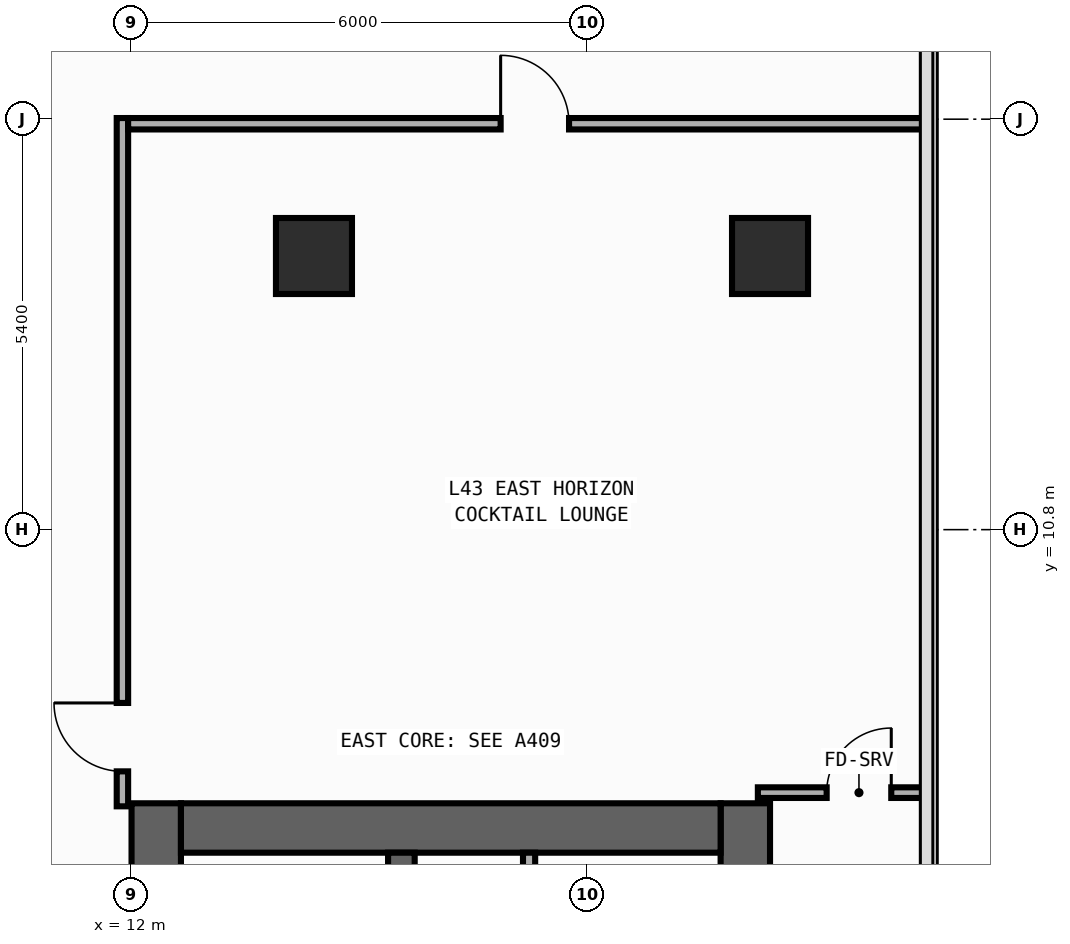
"""IFC4 building model, lengths in metres.
Left out: names, types, materials, properties, quantities, classifications, styles, units other than length and angle.
Written with IfcOpenShell. Run it as: python <this file> out.ifc"""

import sys

from ifc_helpers import new_model, si_unit, direction, frame, frame_2d, origin, origin_2d, place, context, subcontext, project, spatial, rectangle, extrude, element, fill, save


model = new_model("IFC4")
c1 = context("Model", 3, precision=1e-05, world=origin(), true_north=direction((0.0, 1.0)))
c2 = subcontext(c1, "Body", "Model", "MODEL_VIEW")
j1 = project(units=[si_unit("LENGTHUNIT", "METRE"), si_unit("PLANEANGLEUNIT", "RADIAN")], contexts=[c1])
p1 = place(None, origin())
s1 = spatial("IfcSite", under=j1, at=p1, CompositionType="ELEMENT")
p2 = place(p1, origin())
s2 = spatial("IfcBuilding", under=s1, at=p2, CompositionType="ELEMENT")
p3 = place(p2, frame((0.0, 0.0, 187.8)))
s3 = spatial("IfcBuildingStorey", under=s2, at=p3, CompositionType="ELEMENT", Elevation=187.8)
p4 = place(p3, frame((12.325, -19.8, 0.0), z_axis=(0.0, 0.0, 1.0), x_axis=(0.0, 1.0, 0.0)))
e1 = element("IfcWall", 1, at=p4, inside=s3, PredefinedType="SHEAR", context=c2, shape_type="SweptSolid", body=[
    extrude(rectangle(XDim=27.0, YDim=0.65, at=frame_2d((13.5, 0.0))), origin(), (0.0, 0.0, 1.0), 3.54),
])
p5 = place(p4, frame((23.05, 0.0, 0.0)))
e2 = element("IfcOpeningElement", 2, at=p5, cuts=e1, PredefinedType="OPENING", context=c2, shape_type="SweptSolid", body=[
    extrude(rectangle(XDim=1.1, YDim=2.2, at=frame_2d((0.55, 1.1))), frame((0.0, 0.335, 0.0), z_axis=(0.0, -1.0, 0.0), x_axis=(1.0, 0.0, 0.0)), (0.0, 0.0, 1.0), 0.67),
])
p6 = place(p4, frame((19.85, 0.0, 0.0)))
e3 = element("IfcOpeningElement", 3, at=p6, cuts=e1, PredefinedType="OPENING", context=c2, shape_type="SweptSolid", body=[
    extrude(rectangle(XDim=1.1, YDim=2.2, at=frame_2d((0.55, 1.1))), frame((0.0, 0.335, 0.0), z_axis=(0.0, -1.0, 0.0), x_axis=(1.0, 0.0, 0.0)), (0.0, 0.0, 1.0), 0.67),
])
p7 = place(p4, frame((16.65, 0.0, 0.0)))
e4 = element("IfcOpeningElement", 4, at=p7, cuts=e1, PredefinedType="OPENING", context=c2, shape_type="SweptSolid", body=[
    extrude(rectangle(XDim=1.1, YDim=2.2, at=frame_2d((0.55, 1.1))), frame((0.0, 0.335, 0.0), z_axis=(0.0, -1.0, 0.0), x_axis=(1.0, 0.0, 0.0)), (0.0, 0.0, 1.0), 0.67),
])
p8 = place(p4, frame((10.175, 0.0, 0.0)))
e5 = element("IfcOpeningElement", 5, at=p8, cuts=e1, PredefinedType="OPENING", context=c2, shape_type="SweptSolid", body=[
    extrude(rectangle(XDim=0.85, YDim=2.1, at=frame_2d((0.425, 1.05))), frame((0.0, 0.335, 0.0), z_axis=(0.0, -1.0, 0.0), x_axis=(1.0, 0.0, 0.0)), (0.0, 0.0, 1.0), 0.67),
])
p9 = place(p4, frame((12.725, 0.0, 0.0)))
e6 = element("IfcOpeningElement", 6, at=p9, cuts=e1, PredefinedType="OPENING", context=c2, shape_type="SweptSolid", body=[
    extrude(rectangle(XDim=1.15, YDim=2.2, at=frame_2d((0.575, 1.1))), frame((0.0, 0.335, 0.0), z_axis=(0.0, -1.0, 0.0), x_axis=(1.0, 0.0, 0.0)), (0.0, 0.0, 1.0), 0.67),
])
p10 = place(p4, frame((25.125, 0.0, 0.0)))
e7 = element("IfcOpeningElement", 7, at=p10, cuts=e1, PredefinedType="OPENING", context=c2, shape_type="SweptSolid", body=[
    extrude(rectangle(XDim=0.85, YDim=2.1, at=frame_2d((0.425, 1.05))), frame((0.0, 0.335, 0.0), z_axis=(0.0, -1.0, 0.0), x_axis=(1.0, 0.0, 0.0)), (0.0, 0.0, 1.0), 0.67),
])
p11 = place(p3, frame((20.075, -19.8, 0.0), z_axis=(0.0, 0.0, 1.0), x_axis=(0.0, 1.0, 0.0)))
e8 = element("IfcWall", 8, at=p11, inside=s3, PredefinedType="SHEAR", context=c2, shape_type="SweptSolid", body=[
    extrude(rectangle(XDim=27.0, YDim=0.65, at=frame_2d((13.5, 0.0))), origin(), (0.0, 0.0, 1.0), 3.54),
])
p12 = place(p3, frame((12.65, 6.875, 0.0), z_axis=(0.0, 0.0, 1.0), x_axis=(1.0, 0.0, 0.0)))
e9 = element("IfcWall", 9, at=p12, inside=s3, PredefinedType="SHEAR", context=c2, shape_type="SweptSolid", body=[
    extrude(rectangle(XDim=7.1, YDim=0.65, at=frame_2d((3.55, 0.0))), origin(), (0.0, 0.0, 1.0), 3.54),
])
p13 = place(p3, frame((15.55, -19.15, 0.0), z_axis=(0.0, 0.0, 1.0), x_axis=(0.0, 1.0, 0.0)))
e10 = element("IfcWall", 10, at=p13, inside=s3, PredefinedType="SHEAR", context=c2, shape_type="SweptSolid", body=[
    extrude(rectangle(XDim=25.7, YDim=0.35, at=frame_2d((12.85, 0.0))), origin(), (0.0, 0.0, 1.0), 3.54),
])
p14 = place(p13, frame((12.075, 0.0, 0.0)))
e11 = element("IfcOpeningElement", 11, at=p14, cuts=e10, PredefinedType="OPENING", context=c2, shape_type="SweptSolid", body=[
    extrude(rectangle(XDim=1.15, YDim=2.2, at=frame_2d((0.575, 1.1))), frame((0.0, 0.185, 0.0), z_axis=(0.0, -1.0, 0.0), x_axis=(1.0, 0.0, 0.0)), (0.0, 0.0, 1.0), 0.37),
])
p15 = place(p13, frame((24.475, 0.0, 0.0)))
e12 = element("IfcOpeningElement", 12, at=p15, cuts=e10, PredefinedType="OPENING", context=c2, shape_type="SweptSolid", body=[
    extrude(rectangle(XDim=0.85, YDim=2.1, at=frame_2d((0.425, 1.05))), frame((0.0, 0.185, 0.0), z_axis=(0.0, -1.0, 0.0), x_axis=(1.0, 0.0, 0.0)), (0.0, 0.0, 1.0), 0.37),
])
for number, where, z_axis, x_axis in (
    (13, (20.4, 14.4, 0.0), (0.0, 0.0, 1.0), (1.0, 0.0, 0.0)),
    (14, (14.4, 14.4, 0.0), (0.0, 0.0, 1.0), (1.0, 0.0, 0.0)),
):
    element("IfcColumn", number, at=place(p3, frame(where, z_axis=z_axis, x_axis=x_axis)), inside=s3, PredefinedType="COLUMN", context=c2, shape_type="SweptSolid", body=[
        extrude(rectangle(XDim=1.0, YDim=1.0, at=origin_2d()), origin(), (0.0, 0.0, 1.0), 3.8),
    ])
p16 = place(p3, frame((17.23, 4.17, 0.0), z_axis=(0.0, 0.0, 1.0), x_axis=(0.0, 1.0, 0.0)))
e15 = element("IfcWall", 15, at=p16, inside=s3, PredefinedType="PARTITIONING", context=c2, shape_type="SweptSolid", body=[
    extrude(rectangle(XDim=2.38, YDim=0.16, at=frame_2d((1.19, 0.0))), origin(), (0.0, 0.0, 1.0), 3.54),
])
p17 = place(p16, frame((0.46, 0.0, 0.0)))
e16 = element("IfcOpeningElement", 16, at=p17, cuts=e15, PredefinedType="OPENING", context=c2, shape_type="SweptSolid", body=[
    extrude(rectangle(XDim=0.85, YDim=2.1, at=frame_2d((0.425, 1.05))), frame((0.0, 0.09, 0.0), z_axis=(0.0, -1.0, 0.0), x_axis=(1.0, 0.0, 0.0)), (0.0, 0.0, 1.0), 0.18),
])
p18 = place(p3, frame((11.88, 7.16, 0.0), z_axis=(0.0, 0.0, 1.0), x_axis=(0.0, 1.0, 0.0)))
e17 = element("IfcWall", 17, at=p18, inside=s3, PredefinedType="PARTITIONING", context=c2, shape_type="SweptSolid", body=[
    extrude(rectangle(XDim=9.055, YDim=0.15, at=frame_2d((4.528, 0.0))), origin(), (0.0, 0.0, 1.0), 3.54),
])
p19 = place(p18, frame((0.46, 0.0, 0.0)))
e18 = element("IfcOpeningElement", 18, at=p19, cuts=e17, PredefinedType="OPENING", context=c2, shape_type="SweptSolid", body=[
    extrude(rectangle(XDim=0.9, YDim=2.15, at=frame_2d((0.45, 1.075))), frame((0.0, 0.085, 0.0), z_axis=(0.0, -1.0, 0.0), x_axis=(1.0, 0.0, 0.0)), (0.0, 0.0, 1.0), 0.17),
])
p20 = place(p3, frame((11.955, 16.14, 0.0), z_axis=(0.0, 0.0, 1.0), x_axis=(1.0, 0.0, 0.0)))
e19 = element("IfcWall", 19, at=p20, inside=s3, PredefinedType="PARTITIONING", context=c2, shape_type="SweptSolid", body=[
    extrude(rectangle(XDim=10.5, YDim=0.15, at=frame_2d((5.25, 0.0))), origin(), (0.0, 0.0, 1.0), 3.54),
])
p21 = place(p20, frame((4.901, 0.0, 0.0)))
e20 = element("IfcOpeningElement", 20, at=p21, cuts=e19, PredefinedType="OPENING", context=c2, shape_type="SweptSolid", body=[
    extrude(rectangle(XDim=0.9, YDim=2.15, at=frame_2d((0.45, 1.075))), frame((0.0, 0.085, 0.0), z_axis=(0.0, -1.0, 0.0), x_axis=(1.0, 0.0, 0.0)), (0.0, 0.0, 1.0), 0.17),
])
p22 = place(p3, frame((20.24, 7.34, 0.0), z_axis=(0.0, 0.0, 1.0), x_axis=(1.0, 0.0, 0.0)))
e21 = element("IfcWall", 21, at=p22, inside=s3, PredefinedType="PARTITIONING", context=c2, shape_type="SweptSolid", body=[
    extrude(rectangle(XDim=2.215, YDim=0.14, at=frame_2d((1.107, 0.0))), origin(), (0.0, 0.0, 1.0), 3.54),
])
p23 = place(p22, frame((0.905, 0.0, 0.0)))
e22 = element("IfcOpeningElement", 22, at=p23, cuts=e21, PredefinedType="OPENING", context=c2, shape_type="SweptSolid", body=[
    extrude(rectangle(XDim=0.85, YDim=2.1, at=frame_2d((0.425, 1.05))), frame((0.0, 0.08, 0.0), z_axis=(0.0, -1.0, 0.0), x_axis=(1.0, 0.0, 0.0)), (0.0, 0.0, 1.0), 0.16),
])
p24 = place(p19, origin())
e23 = element("IfcDoor", 23, at=p24, inside=s3, OperationType="SINGLE_SWING_RIGHT", PredefinedType="DOOR", context=c2, shape_type="SweptSolid", body=[
    extrude(rectangle(XDim=0.9, YDim=2.15, at=frame_2d((0.45, 1.075))), frame((0.0, 0.025, 0.0), z_axis=(0.0, -1.0, 0.0), x_axis=(1.0, 0.0, 0.0)), (0.0, 0.0, 1.0), 0.05),
])
fill(e18, e23)
p25 = place(p21, origin())
e24 = element("IfcDoor", 24, at=p25, inside=s3, OperationType="SINGLE_SWING_LEFT", PredefinedType="DOOR", context=c2, shape_type="SweptSolid", body=[
    extrude(rectangle(XDim=0.9, YDim=2.15, at=frame_2d((0.45, 1.075))), frame((0.0, 0.025, 0.0), z_axis=(0.0, -1.0, 0.0), x_axis=(1.0, 0.0, 0.0)), (0.0, 0.0, 1.0), 0.05),
])
fill(e20, e24)
p26 = place(p23, origin())
e25 = element("IfcDoor", 25, at=p26, inside=s3, OperationType="SINGLE_SWING_RIGHT", PredefinedType="DOOR", context=c2, shape_type="SweptSolid", body=[
    extrude(rectangle(XDim=0.85, YDim=2.1, at=frame_2d((0.425, 1.05))), frame((0.0, 0.025, 0.0), z_axis=(0.0, -1.0, 0.0), x_axis=(1.0, 0.0, 0.0)), (0.0, 0.0, 1.0), 0.05),
])
fill(e22, e25)
save(model, sys.argv[1])
